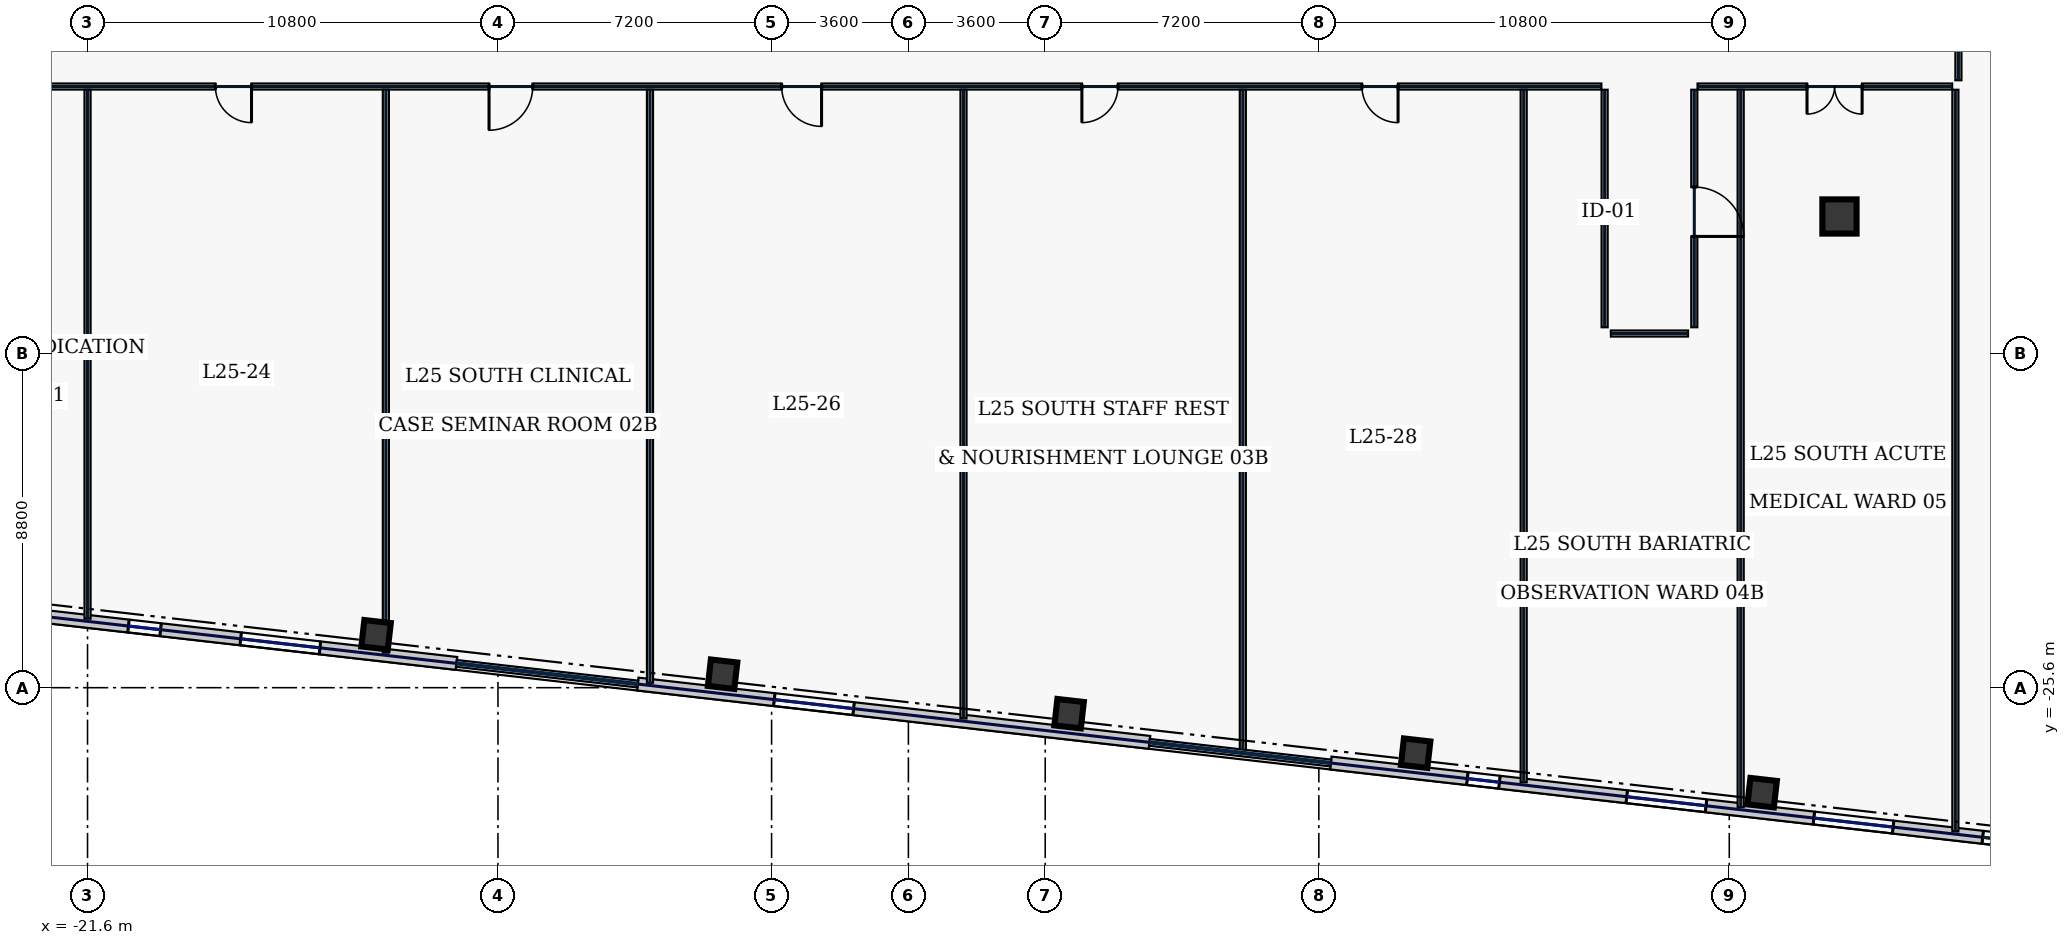
"""IFC4 building model, lengths in metres.
Left out: names, types, materials, properties, quantities, classifications, styles, units other than length and angle.
Written with IfcOpenShell. Run it as: python <this file> out.ifc"""

import sys

from ifc_helpers import new_model, si_unit, direction, frame, frame_2d, origin, origin_2d, place, context, subcontext, project, spatial, rectangle, hollow_rectangle, extrude, element, fill, save


model = new_model("IFC4")
c1 = context("Model", 3, precision=1e-05, world=origin(), true_north=direction((0.0, 1.0)))
c2 = subcontext(c1, "Body", "Model", "MODEL_VIEW")
j1 = project(units=[si_unit("LENGTHUNIT", "METRE"), si_unit("PLANEANGLEUNIT", "RADIAN")], contexts=[c1])
p1 = place(None, origin())
s1 = spatial("IfcSite", under=j1, at=p1, CompositionType="ELEMENT")
p2 = place(p1, origin())
s2 = spatial("IfcBuilding", under=s1, at=p2, CompositionType="ELEMENT")
p3 = place(p2, frame((0.0, 0.0, 113.4)))
s3 = spatial("IfcBuildingStorey", under=s2, at=p3, CompositionType="ELEMENT", Elevation=113.4)
p4 = place(p3, frame((24.5, -13.2, 0.0), z_axis=(0.0, 0.0, 1.0), x_axis=(1.0, 0.0, 0.0)))
e1 = element("IfcColumn", 1, at=p4, inside=s3, PredefinedType="COLUMN", context=c2, shape_type="SweptSolid", body=[
    extrude(hollow_rectangle(XDim=0.9, YDim=0.9, WallThickness=0.04, at=origin_2d()), origin(), (0.0, 0.0, 1.0), 3.74),
])
for number, where, z_axis, x_axis in (
    (2, (-14.008, -24.207, 0.0), (0.0, 0.0, 1.0), (0.994, -0.113, 0.0)),
    (3, (-4.89, -25.246, 0.0), (0.0, 0.0, 1.0), (0.994, -0.113, 0.0)),
    (4, (4.229, -26.284, 0.0), (0.0, 0.0, 1.0), (0.994, -0.113, 0.0)),
    (5, (13.347, -27.323, 0.0), (0.0, 0.0, 1.0), (0.994, -0.113, 0.0)),
    (6, (22.465, -28.362, 0.0), (0.0, 0.0, 1.0), (0.994, -0.113, 0.0)),
):
    element("IfcColumn", number, at=place(p3, frame(where, z_axis=z_axis, x_axis=x_axis)), inside=s3, PredefinedType="COLUMN", context=c2, shape_type="SweptSolid", body=[
        extrude(hollow_rectangle(XDim=0.7, YDim=0.7, WallThickness=0.032, at=origin_2d()), origin(), (0.0, 0.0, 1.0), 3.74),
    ])
p5 = place(p3, frame((-32.977, -22.559, 0.0), z_axis=(0.0, 0.0, 1.0), x_axis=(0.993571214605, -0.113208840243, 0.0)))
e7 = element("IfcWall", 7, at=p5, inside=s3, PredefinedType="STANDARD", context=c2, shape_type="SweptSolid", body=[
    extrude(rectangle(XDim=21.223, YDim=0.34, at=frame_2d((10.611, 0.0))), origin(), (0.0, 0.0, 1.0), 3.74),
])
p6 = place(p5, frame((2.108, 0.0, 0.67)))
e8 = element("IfcOpeningElement", 8, at=p6, cuts=e7, PredefinedType="OPENING", context=c2, shape_type="SweptSolid", body=[
    extrude(rectangle(XDim=2.1, YDim=2.2, at=frame_2d((1.05, 1.1))), frame((0.0, 0.18, 0.0), z_axis=(0.0, -1.0, 0.0), x_axis=(1.0, 0.0, 0.0)), (0.0, 0.0, 1.0), 0.36),
])
p7 = place(p5, frame((6.329, 0.0, 0.67)))
e9 = element("IfcOpeningElement", 9, at=p7, cuts=e7, PredefinedType="OPENING", context=c2, shape_type="SweptSolid", body=[
    extrude(rectangle(XDim=2.1, YDim=2.2, at=frame_2d((1.05, 1.1))), frame((0.0, 0.18, 0.0), z_axis=(0.0, -1.0, 0.0), x_axis=(1.0, 0.0, 0.0)), (0.0, 0.0, 1.0), 0.36),
])
p8 = place(p5, frame((12.535, 0.0, 0.67)))
e10 = element("IfcOpeningElement", 10, at=p8, cuts=e7, PredefinedType="OPENING", context=c2, shape_type="SweptSolid", body=[
    extrude(rectangle(XDim=0.85, YDim=1.85, at=frame_2d((0.425, 0.925))), frame((0.0, 0.18, 0.0), z_axis=(0.0, -1.0, 0.0), x_axis=(1.0, 0.0, 0.0)), (0.0, 0.0, 1.0), 0.36),
])
p9 = place(p5, frame((15.506, 0.0, 0.67)))
e11 = element("IfcOpeningElement", 11, at=p9, cuts=e7, PredefinedType="OPENING", context=c2, shape_type="SweptSolid", body=[
    extrude(rectangle(XDim=2.1, YDim=2.2, at=frame_2d((1.05, 1.1))), frame((0.0, 0.18, 0.0), z_axis=(0.0, -1.0, 0.0), x_axis=(1.0, 0.0, 0.0)), (0.0, 0.0, 1.0), 0.36),
])
p10 = place(p3, frame((-7.122, -25.504, 0.0), z_axis=(0.0, 0.0, 1.0), x_axis=(0.993571685551, -0.11320470693, 0.0)))
e12 = element("IfcWall", 12, at=p10, inside=s3, PredefinedType="STANDARD", context=c2, shape_type="SweptSolid", body=[
    extrude(rectangle(XDim=13.554, YDim=0.34, at=frame_2d((6.777, 0.0))), origin(), (0.0, 0.0, 1.0), 3.74),
])
p11 = place(p10, frame((3.616, 0.0, 0.67)))
e13 = element("IfcOpeningElement", 13, at=p11, cuts=e12, PredefinedType="OPENING", context=c2, shape_type="SweptSolid", body=[
    extrude(rectangle(XDim=2.1, YDim=2.2, at=frame_2d((1.05, 1.1))), frame((0.0, 0.18, 0.0), z_axis=(0.0, -1.0, 0.0), x_axis=(1.0, 0.0, 0.0)), (0.0, 0.0, 1.0), 0.36),
])
p12 = place(p3, frame((11.115, -27.582, 0.0), z_axis=(0.0, 0.0, 1.0), x_axis=(0.993572655904, -0.113196190044, 0.0)))
e14 = element("IfcWall", 14, at=p12, inside=s3, PredefinedType="STANDARD", context=c2, shape_type="SweptSolid", body=[
    extrude(rectangle(XDim=21.223, YDim=0.34, at=frame_2d((10.611, 0.0))), origin(), (0.0, 0.0, 1.0), 3.74),
])
p13 = place(p12, frame((3.616, 0.0, 0.67)))
e15 = element("IfcOpeningElement", 15, at=p13, cuts=e14, PredefinedType="OPENING", context=c2, shape_type="SweptSolid", body=[
    extrude(rectangle(XDim=0.85, YDim=1.85, at=frame_2d((0.425, 0.925))), frame((0.0, 0.18, 0.0), z_axis=(0.0, -1.0, 0.0), x_axis=(1.0, 0.0, 0.0)), (0.0, 0.0, 1.0), 0.36),
])
p14 = place(p12, frame((7.838, 0.0, 0.67)))
e16 = element("IfcOpeningElement", 16, at=p14, cuts=e14, PredefinedType="OPENING", context=c2, shape_type="SweptSolid", body=[
    extrude(rectangle(XDim=2.1, YDim=2.2, at=frame_2d((1.05, 1.1))), frame((0.0, 0.18, 0.0), z_axis=(0.0, -1.0, 0.0), x_axis=(1.0, 0.0, 0.0)), (0.0, 0.0, 1.0), 0.36),
])
p15 = place(p12, frame((12.794, 0.0, 0.67)))
e17 = element("IfcOpeningElement", 17, at=p15, cuts=e14, PredefinedType="OPENING", context=c2, shape_type="SweptSolid", body=[
    extrude(rectangle(XDim=2.1, YDim=2.2, at=frame_2d((1.05, 1.1))), frame((0.0, 0.18, 0.0), z_axis=(0.0, -1.0, 0.0), x_axis=(1.0, 0.0, 0.0)), (0.0, 0.0, 1.0), 0.36),
])
p16 = place(p12, frame((17.265, 0.0, 0.22)))
e18 = element("IfcOpeningElement", 18, at=p16, cuts=e14, PredefinedType="OPENING", context=c2, shape_type="SweptSolid", body=[
    extrude(rectangle(XDim=1.6, YDim=1.2, at=frame_2d((0.8, 0.6))), frame((0.0, 0.18, 0.0), z_axis=(0.0, -1.0, 0.0), x_axis=(1.0, 0.0, 0.0)), (0.0, 0.0, 1.0), 0.36),
])
p17 = place(p3, frame((18.235, -9.78, 0.0), z_axis=(0.0, 0.0, 1.0), x_axis=(-1.0, 0.0, 0.0)))
e19 = element("IfcWall", 19, at=p17, inside=s3, PredefinedType="PARTITIONING", context=c2, shape_type="SweptSolid", body=[
    extrude(rectangle(XDim=45.7, YDim=0.16, at=frame_2d((22.85, 0.0))), origin(), (0.0, 0.0, 1.0), 3.74),
])
p18 = place(p17, frame((42.226, 0.0, 0.0)))
e20 = element("IfcOpeningElement", 20, at=p18, cuts=e19, PredefinedType="OPENING", context=c2, shape_type="SweptSolid", body=[
    extrude(rectangle(XDim=0.95, YDim=2.2, at=frame_2d((0.475, 1.1))), frame((0.0, 0.09, 0.0), z_axis=(0.0, -1.0, 0.0), x_axis=(1.0, 0.0, 0.0)), (0.0, 0.0, 1.0), 0.18),
])
p19 = place(p17, frame((35.52, 0.0, 0.0)))
e21 = element("IfcOpeningElement", 21, at=p19, cuts=e19, PredefinedType="OPENING", context=c2, shape_type="SweptSolid", body=[
    extrude(rectangle(XDim=0.95, YDim=2.2, at=frame_2d((0.475, 1.1))), frame((0.0, 0.09, 0.0), z_axis=(0.0, -1.0, 0.0), x_axis=(1.0, 0.0, 0.0)), (0.0, 0.0, 1.0), 0.18),
])
p20 = place(p17, frame((28.12, 0.0, 0.0)))
e22 = element("IfcOpeningElement", 22, at=p20, cuts=e19, PredefinedType="OPENING", context=c2, shape_type="SweptSolid", body=[
    extrude(rectangle(XDim=1.15, YDim=2.2, at=frame_2d((0.575, 1.1))), frame((0.0, 0.09, 0.0), z_axis=(0.0, -1.0, 0.0), x_axis=(1.0, 0.0, 0.0)), (0.0, 0.0, 1.0), 0.18),
])
p21 = place(p17, frame((20.52, 0.0, 0.0)))
e23 = element("IfcOpeningElement", 23, at=p21, cuts=e19, PredefinedType="OPENING", context=c2, shape_type="SweptSolid", body=[
    extrude(rectangle(XDim=1.05, YDim=2.2, at=frame_2d((0.525, 1.1))), frame((0.0, 0.09, 0.0), z_axis=(0.0, -1.0, 0.0), x_axis=(1.0, 0.0, 0.0)), (0.0, 0.0, 1.0), 0.18),
])
p22 = place(p17, frame((12.72, 0.0, 0.0)))
e24 = element("IfcOpeningElement", 24, at=p22, cuts=e19, PredefinedType="OPENING", context=c2, shape_type="SweptSolid", body=[
    extrude(rectangle(XDim=0.95, YDim=2.2, at=frame_2d((0.475, 1.1))), frame((0.0, 0.09, 0.0), z_axis=(0.0, -1.0, 0.0), x_axis=(1.0, 0.0, 0.0)), (0.0, 0.0, 1.0), 0.18),
])
p23 = place(p17, frame((5.35, 0.0, 0.0)))
e25 = element("IfcOpeningElement", 25, at=p23, cuts=e19, PredefinedType="OPENING", context=c2, shape_type="SweptSolid", body=[
    extrude(rectangle(XDim=0.95, YDim=2.2, at=frame_2d((0.475, 1.1))), frame((0.0, 0.09, 0.0), z_axis=(0.0, -1.0, 0.0), x_axis=(1.0, 0.0, 0.0)), (0.0, 0.0, 1.0), 0.18),
])
p24 = place(p3, frame((27.63, 9.665, 0.0), z_axis=(0.0, 0.0, 1.0), x_axis=(0.0, -1.0, 0.0)))
e26 = element("IfcWall", 26, at=p24, inside=s3, PredefinedType="PARTITIONING", context=c2, shape_type="SweptSolid", body=[
    extrude(rectangle(XDim=19.28, YDim=0.16, at=frame_2d((9.64, 0.0))), origin(), (0.0, 0.0, 1.0), 3.74),
])
p25 = place(p24, frame((16.531, 0.0, 0.0)))
e27 = element("IfcOpeningElement", 27, at=p25, cuts=e26, PredefinedType="OPENING", context=c2, shape_type="SweptSolid", body=[
    extrude(rectangle(XDim=0.95, YDim=2.2, at=frame_2d((0.475, 1.1))), frame((0.0, 0.09, 0.0), z_axis=(0.0, -1.0, 0.0), x_axis=(1.0, 0.0, 0.0)), (0.0, 0.0, 1.0), 0.18),
])
p26 = place(p24, frame((11.875, 0.0, 0.0)))
e28 = element("IfcOpeningElement", 28, at=p26, cuts=e26, PredefinedType="OPENING", context=c2, shape_type="SweptSolid", body=[
    extrude(rectangle(XDim=0.95, YDim=2.2, at=frame_2d((0.475, 1.1))), frame((0.0, 0.09, 0.0), z_axis=(0.0, -1.0, 0.0), x_axis=(1.0, 0.0, 0.0)), (0.0, 0.0, 1.0), 0.18),
])
p27 = place(p24, frame((6.675, 0.0, 0.0)))
e29 = element("IfcOpeningElement", 29, at=p27, cuts=e26, PredefinedType="OPENING", context=c2, shape_type="SweptSolid", body=[
    extrude(rectangle(XDim=0.95, YDim=2.2, at=frame_2d((0.475, 1.1))), frame((0.0, 0.09, 0.0), z_axis=(0.0, -1.0, 0.0), x_axis=(1.0, 0.0, 0.0)), (0.0, 0.0, 1.0), 0.18),
])
p28 = place(p24, frame((1.994, 0.0, 0.0)))
e30 = element("IfcOpeningElement", 30, at=p28, cuts=e26, PredefinedType="OPENING", context=c2, shape_type="SweptSolid", body=[
    extrude(rectangle(XDim=0.95, YDim=2.2, at=frame_2d((0.475, 1.1))), frame((0.0, 0.09, 0.0), z_axis=(0.0, -1.0, 0.0), x_axis=(1.0, 0.0, 0.0)), (0.0, 0.0, 1.0), 0.18),
])
p29 = place(p3, frame((27.465, -9.78, 0.0), z_axis=(0.0, 0.0, 1.0), x_axis=(-1.0, 0.0, 0.0)))
e31 = element("IfcWall", 31, at=p29, inside=s3, PredefinedType="PARTITIONING", context=c2, shape_type="SweptSolid", body=[
    extrude(rectangle(XDim=6.7, YDim=0.16, at=frame_2d((3.35, 0.0))), origin(), (0.0, 0.0, 1.0), 3.74),
])
p30 = place(p29, frame((2.369, 0.0, 0.0)))
e32 = element("IfcOpeningElement", 32, at=p30, cuts=e31, PredefinedType="OPENING", context=c2, shape_type="SweptSolid", body=[
    extrude(rectangle(XDim=1.45, YDim=2.2, at=frame_2d((0.725, 1.1))), frame((0.0, 0.09, 0.0), z_axis=(0.0, -1.0, 0.0), x_axis=(1.0, 0.0, 0.0)), (0.0, 0.0, 1.0), 0.18),
])
p31 = place(p3, frame((20.68, -9.865, 0.0), z_axis=(0.0, 0.0, 1.0), x_axis=(0.0, -1.0, 0.0)))
e33 = element("IfcWall", 33, at=p31, inside=s3, PredefinedType="PARTITIONING", context=c2, shape_type="SweptSolid", body=[
    extrude(rectangle(XDim=6.25, YDim=0.16, at=frame_2d((3.125, 0.0))), origin(), (0.0, 0.0, 1.0), 3.74),
])
p32 = place(p31, frame((2.56, 0.0, 0.0)))
e34 = element("IfcOpeningElement", 34, at=p32, cuts=e33, PredefinedType="OPENING", context=c2, shape_type="SweptSolid", body=[
    extrude(rectangle(XDim=1.3, YDim=2.2, at=frame_2d((0.65, 1.1))), frame((0.0, 0.09, 0.0), z_axis=(0.0, -1.0, 0.0), x_axis=(1.0, 0.0, 0.0)), (0.0, 0.0, 1.0), 0.18),
])
p33 = place(p3, frame((20.515, -16.28, 0.0), z_axis=(0.0, 0.0, 1.0), x_axis=(-1.0, 0.0, 0.0)))
e35 = element("IfcWall", 35, at=p33, inside=s3, PredefinedType="PARTITIONING", context=c2, shape_type="SweptSolid", body=[
    extrude(rectangle(XDim=2.03, YDim=0.16, at=frame_2d((1.015, 0.0))), origin(), (0.0, 0.0, 1.0), 3.74),
])
p34 = place(p3, frame((18.32, -16.115, 0.0), z_axis=(0.0, 0.0, 1.0), x_axis=(0.0, 1.0, 0.0)))
e36 = element("IfcWall", 36, at=p34, inside=s3, PredefinedType="PARTITIONING", context=c2, shape_type="SweptSolid", body=[
    extrude(rectangle(XDim=6.25, YDim=0.16, at=frame_2d((3.125, 0.0))), origin(), (0.0, 0.0, 1.0), 3.74),
])
p35 = place(p3, frame((27.55, -29.385, 0.0), z_axis=(0.0, 0.0, 1.0), x_axis=(0.0, 1.0, 0.0)))
e37 = element("IfcWall", 37, at=p35, inside=s3, PredefinedType="PARTITIONING", context=c2, shape_type="SweptSolid", body=[
    extrude(rectangle(XDim=19.52, YDim=0.16, at=frame_2d((9.76, 0.0))), origin(), (0.0, 0.0, 1.0), 3.74),
])
p36 = place(p3, frame((-21.6, -23.784, 0.0), z_axis=(0.0, 0.0, 1.0), x_axis=(0.0, 1.0, 0.0)))
e38 = element("IfcWall", 38, at=p36, inside=s3, PredefinedType="PARTITIONING", context=c2, shape_type="SweptSolid", body=[
    extrude(rectangle(XDim=13.919, YDim=0.16, at=frame_2d((6.96, 0.0))), origin(), (0.0, 0.0, 1.0), 3.74),
])
p37 = place(p3, frame((-6.8, -25.471, 0.0), z_axis=(0.0, 0.0, 1.0), x_axis=(0.0, 1.0, 0.0)))
e39 = element("IfcWall", 39, at=p37, inside=s3, PredefinedType="PARTITIONING", context=c2, shape_type="SweptSolid", body=[
    extrude(rectangle(XDim=15.606, YDim=0.16, at=frame_2d((7.803, 0.0))), origin(), (0.0, 0.0, 1.0), 3.74),
])
p38 = place(p3, frame((8.8, -27.248, 0.0), z_axis=(0.0, 0.0, 1.0), x_axis=(0.0, 1.0, 0.0)))
e40 = element("IfcWall", 40, at=p38, inside=s3, PredefinedType="PARTITIONING", context=c2, shape_type="SweptSolid", body=[
    extrude(rectangle(XDim=17.383, YDim=0.16, at=frame_2d((8.691, 0.0))), origin(), (0.0, 0.0, 1.0), 3.74),
])
p39 = place(p3, frame((21.9, -28.74, 0.0), z_axis=(0.0, 0.0, 1.0), x_axis=(0.0, 1.0, 0.0)))
e41 = element("IfcWall", 41, at=p39, inside=s3, PredefinedType="PARTITIONING", context=c2, shape_type="SweptSolid", body=[
    extrude(rectangle(XDim=18.875, YDim=0.16, at=frame_2d((9.438, 0.0))), origin(), (0.0, 0.0, 1.0), 3.74),
])
p40 = place(p3, frame((-13.75, -24.679, 0.0), z_axis=(0.0, 0.0, 1.0), x_axis=(0.0, 1.0, 0.0)))
e42 = element("IfcWall", 42, at=p40, inside=s3, PredefinedType="PARTITIONING", context=c2, shape_type="SweptSolid", body=[
    extrude(rectangle(XDim=14.814, YDim=0.16, at=frame_2d((7.407, 0.0))), origin(), (0.0, 0.0, 1.0), 3.74),
])
p41 = place(p3, frame((1.45, -26.411, 0.0), z_axis=(0.0, 0.0, 1.0), x_axis=(0.0, 1.0, 0.0)))
e43 = element("IfcWall", 43, at=p41, inside=s3, PredefinedType="PARTITIONING", context=c2, shape_type="SweptSolid", body=[
    extrude(rectangle(XDim=16.546, YDim=0.16, at=frame_2d((8.273, 0.0))), origin(), (0.0, 0.0, 1.0), 3.74),
])
p42 = place(p3, frame((16.19, -28.09, 0.0), z_axis=(0.0, 0.0, 1.0), x_axis=(0.0, 1.0, 0.0)))
e44 = element("IfcWall", 44, at=p42, inside=s3, PredefinedType="PARTITIONING", context=c2, shape_type="SweptSolid", body=[
    extrude(rectangle(XDim=18.225, YDim=0.16, at=frame_2d((9.113, 0.0))), origin(), (0.0, 0.0, 1.0), 3.74),
])
p43 = place(p8, origin())
e45 = element("IfcWindow", 45, at=p43, inside=s3, PartitioningType="SINGLE_PANEL", PredefinedType="WINDOW", context=c2, shape_type="SweptSolid", body=[
    extrude(rectangle(XDim=0.85, YDim=1.85, at=frame_2d((0.425, 0.925))), frame((0.0, 0.03, 0.0), z_axis=(0.0, -1.0, 0.0), x_axis=(1.0, 0.0, 0.0)), (0.0, 0.0, 1.0), 0.06),
])
fill(e10, e45)
p44 = place(p9, origin())
e46 = element("IfcWindow", 46, at=p44, inside=s3, PartitioningType="SINGLE_PANEL", PredefinedType="WINDOW", context=c2, shape_type="SweptSolid", body=[
    extrude(rectangle(XDim=2.1, YDim=2.2, at=frame_2d((1.05, 1.1))), frame((0.0, 0.03, 0.0), z_axis=(0.0, -1.0, 0.0), x_axis=(1.0, 0.0, 0.0)), (0.0, 0.0, 1.0), 0.06),
])
fill(e11, e46)
p45 = place(p11, origin())
e47 = element("IfcWindow", 47, at=p45, inside=s3, PartitioningType="SINGLE_PANEL", PredefinedType="WINDOW", context=c2, shape_type="SweptSolid", body=[
    extrude(rectangle(XDim=2.1, YDim=2.2, at=frame_2d((1.05, 1.1))), frame((0.0, 0.03, 0.0), z_axis=(0.0, -1.0, 0.0), x_axis=(1.0, 0.0, 0.0)), (0.0, 0.0, 1.0), 0.06),
])
fill(e13, e47)
p46 = place(p13, origin())
e48 = element("IfcWindow", 48, at=p46, inside=s3, PartitioningType="SINGLE_PANEL", PredefinedType="WINDOW", context=c2, shape_type="SweptSolid", body=[
    extrude(rectangle(XDim=0.85, YDim=1.85, at=frame_2d((0.425, 0.925))), frame((0.0, 0.03, 0.0), z_axis=(0.0, -1.0, 0.0), x_axis=(1.0, 0.0, 0.0)), (0.0, 0.0, 1.0), 0.06),
])
fill(e15, e48)
p47 = place(p14, origin())
e49 = element("IfcWindow", 49, at=p47, inside=s3, PartitioningType="SINGLE_PANEL", PredefinedType="WINDOW", context=c2, shape_type="SweptSolid", body=[
    extrude(rectangle(XDim=2.1, YDim=2.2, at=frame_2d((1.05, 1.1))), frame((0.0, 0.03, 0.0), z_axis=(0.0, -1.0, 0.0), x_axis=(1.0, 0.0, 0.0)), (0.0, 0.0, 1.0), 0.06),
])
fill(e16, e49)
p48 = place(p15, origin())
e50 = element("IfcWindow", 50, at=p48, inside=s3, PartitioningType="SINGLE_PANEL", PredefinedType="WINDOW", context=c2, shape_type="SweptSolid", body=[
    extrude(rectangle(XDim=2.1, YDim=2.2, at=frame_2d((1.05, 1.1))), frame((0.0, 0.03, 0.0), z_axis=(0.0, -1.0, 0.0), x_axis=(1.0, 0.0, 0.0)), (0.0, 0.0, 1.0), 0.06),
])
fill(e17, e50)
p49 = place(p16, origin())
e51 = element("IfcWindow", 51, at=p49, inside=s3, PartitioningType="SINGLE_PANEL", PredefinedType="WINDOW", context=c2, shape_type="SweptSolid", body=[
    extrude(rectangle(XDim=1.6, YDim=1.2, at=frame_2d((0.8, 0.6))), frame((0.0, 0.03, 0.0), z_axis=(0.0, -1.0, 0.0), x_axis=(1.0, 0.0, 0.0)), (0.0, 0.0, 1.0), 0.06),
])
fill(e18, e51)
p50 = place(p19, origin())
e52 = element("IfcDoor", 52, at=p50, inside=s3, OperationType="SINGLE_SWING_LEFT", PredefinedType="DOOR", context=c2, shape_type="SweptSolid", body=[
    extrude(rectangle(XDim=0.95, YDim=2.2, at=frame_2d((0.475, 1.1))), frame((0.0, 0.025, 0.0), z_axis=(0.0, -1.0, 0.0), x_axis=(1.0, 0.0, 0.0)), (0.0, 0.0, 1.0), 0.05),
])
fill(e21, e52)
p51 = place(p20, origin())
e53 = element("IfcDoor", 53, at=p51, inside=s3, OperationType="SINGLE_SWING_RIGHT", PredefinedType="DOOR", context=c2, shape_type="SweptSolid", body=[
    extrude(rectangle(XDim=1.15, YDim=2.2, at=frame_2d((0.575, 1.1))), frame((0.0, 0.025, 0.0), z_axis=(0.0, -1.0, 0.0), x_axis=(1.0, 0.0, 0.0)), (0.0, 0.0, 1.0), 0.05),
])
fill(e22, e53)
p52 = place(p21, origin())
e54 = element("IfcDoor", 54, at=p52, inside=s3, OperationType="SINGLE_SWING_LEFT", PredefinedType="DOOR", context=c2, shape_type="SweptSolid", body=[
    extrude(rectangle(XDim=1.05, YDim=2.2, at=frame_2d((0.525, 1.1))), frame((0.0, 0.025, 0.0), z_axis=(0.0, -1.0, 0.0), x_axis=(1.0, 0.0, 0.0)), (0.0, 0.0, 1.0), 0.05),
])
fill(e23, e54)
p53 = place(p22, origin())
e55 = element("IfcDoor", 55, at=p53, inside=s3, OperationType="SINGLE_SWING_RIGHT", PredefinedType="DOOR", context=c2, shape_type="SweptSolid", body=[
    extrude(rectangle(XDim=0.95, YDim=2.2, at=frame_2d((0.475, 1.1))), frame((0.0, 0.025, 0.0), z_axis=(0.0, -1.0, 0.0), x_axis=(1.0, 0.0, 0.0)), (0.0, 0.0, 1.0), 0.05),
])
fill(e24, e55)
p54 = place(p23, origin())
e56 = element("IfcDoor", 56, at=p54, inside=s3, OperationType="SINGLE_SWING_LEFT", PredefinedType="DOOR", context=c2, shape_type="SweptSolid", body=[
    extrude(rectangle(XDim=0.95, YDim=2.2, at=frame_2d((0.475, 1.1))), frame((0.0, 0.025, 0.0), z_axis=(0.0, -1.0, 0.0), x_axis=(1.0, 0.0, 0.0)), (0.0, 0.0, 1.0), 0.05),
])
fill(e25, e56)
p55 = place(p32, origin())
e57 = element("IfcDoor", 57, at=p55, inside=s3, OperationType="SINGLE_SWING_RIGHT", PredefinedType="DOOR", context=c2, shape_type="SweptSolid", body=[
    extrude(rectangle(XDim=1.3, YDim=2.2, at=frame_2d((0.65, 1.1))), frame((0.0, 0.025, 0.0), z_axis=(0.0, -1.0, 0.0), x_axis=(1.0, 0.0, 0.0)), (0.0, 0.0, 1.0), 0.05),
])
fill(e34, e57)
p56 = place(p30, origin())
e58 = element("IfcDoor", 58, at=p56, inside=s3, OperationType="DOUBLE_SWING_LEFT", PredefinedType="DOOR", context=c2, shape_type="SweptSolid", body=[
    extrude(rectangle(XDim=1.45, YDim=2.2, at=frame_2d((0.725, 1.1))), frame((0.0, 0.025, 0.0), z_axis=(0.0, -1.0, 0.0), x_axis=(1.0, 0.0, 0.0)), (0.0, 0.0, 1.0), 0.05),
])
fill(e32, e58)
save(model, sys.argv[1])
